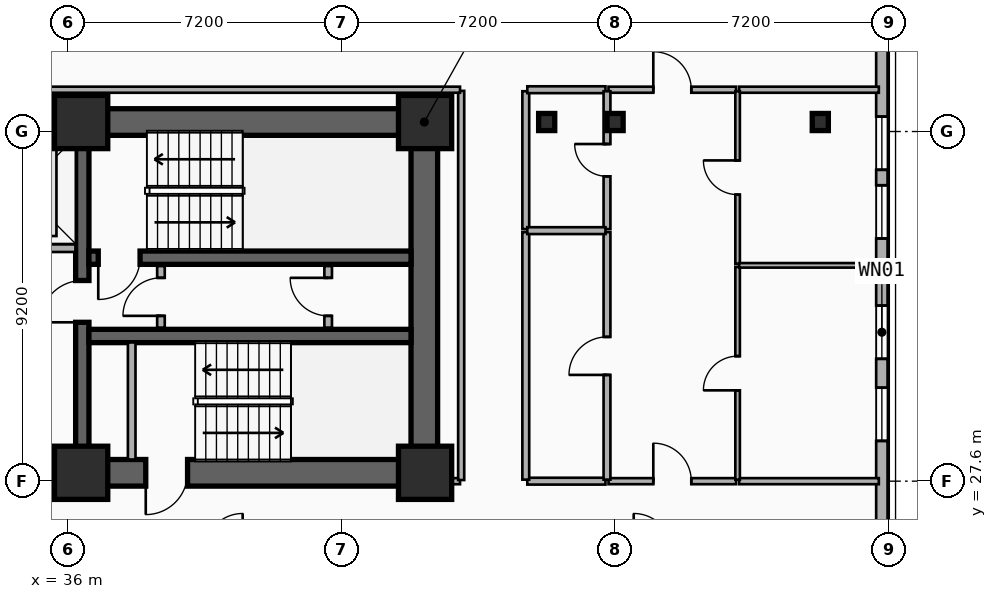
"""IFC4 building model, lengths in metres.
Left out: names, types, materials, properties, quantities, classifications, styles, units other than length and angle.
Written with IfcOpenShell. Run it as: python <this file> out.ifc"""

import sys

from ifc_helpers import new_model, si_unit, direction, frame, frame_2d, origin, origin_2d, place, context, subcontext, project, spatial, rectangle, i_section, extrude, element, fill, save


model = new_model("IFC4")
c1 = context("Model", 3, precision=1e-05, world=origin(), true_north=direction((0.0, 1.0)))
c2 = subcontext(c1, "Body", "Model", "MODEL_VIEW")
j1 = project(units=[si_unit("LENGTHUNIT", "METRE"), si_unit("PLANEANGLEUNIT", "RADIAN")], contexts=[c1])
p1 = place(None, origin())
s1 = spatial("IfcSite", under=j1, at=p1, CompositionType="ELEMENT")
p2 = place(p1, origin())
s2 = spatial("IfcBuilding", under=s1, at=p2, CompositionType="ELEMENT")
p3 = place(p2, frame((0.0, 0.0, 67.5)))
s3 = spatial("IfcBuildingStorey", under=s2, at=p3, CompositionType="ELEMENT", Elevation=67.5)
p4 = place(p3, frame((12.15, 37.05, 0.0), z_axis=(0.0, 0.0, 1.0), x_axis=(1.0, 0.0, 0.0)))
e1 = element("IfcWall", 1, at=p4, inside=s3, PredefinedType="SHEAR", context=c2, shape_type="SweptSolid", body=[
    extrude(rectangle(XDim=33.23, YDim=0.7, at=frame_2d((16.615, 0.0))), origin(), (0.0, 0.0, 1.0), 3.5),
])
p5 = place(p3, frame((45.38, 27.82, 0.0), z_axis=(0.0, 0.0, 1.0), x_axis=(-1.0, 0.0, 0.0)))
e2 = element("IfcWall", 2, at=p5, inside=s3, PredefinedType="SHEAR", context=c2, shape_type="SweptSolid", body=[
    extrude(rectangle(XDim=12.23, YDim=0.7, at=frame_2d((6.115, 0.0))), origin(), (0.0, 0.0, 1.0), 3.5),
])
p6 = place(p5, frame((9.93, 0.0, 0.0)))
e3 = element("IfcOpeningElement", 3, at=p6, cuts=e2, PredefinedType="OPENING", context=c2, shape_type="SweptSolid", body=[
    extrude(rectangle(XDim=1.1, YDim=2.15, at=frame_2d((0.55, 1.075))), frame((0.0, 0.36, 0.0), z_axis=(0.0, -1.0, 0.0), x_axis=(1.0, 0.0, 0.0)), (0.0, 0.0, 1.0), 0.72),
])
p7 = place(p5, frame((6.23, 0.0, 0.0)))
e4 = element("IfcOpeningElement", 4, at=p7, cuts=e2, PredefinedType="OPENING", context=c2, shape_type="SweptSolid", body=[
    extrude(rectangle(XDim=1.1, YDim=2.15, at=frame_2d((0.55, 1.075))), frame((0.0, 0.36, 0.0), z_axis=(0.0, -1.0, 0.0), x_axis=(1.0, 0.0, 0.0)), (0.0, 0.0, 1.0), 0.72),
])
p8 = place(p3, frame((45.38, 28.17, 0.0), z_axis=(0.0, 0.0, 1.0), x_axis=(0.0, 1.0, 0.0)))
e5 = element("IfcWall", 5, at=p8, inside=s3, PredefinedType="SHEAR", context=c2, shape_type="SweptSolid", body=[
    extrude(rectangle(XDim=8.53, YDim=0.7, at=frame_2d((4.265, 0.0))), origin(), (0.0, 0.0, 1.0), 3.5),
])
p9 = place(p3, frame((36.38, 28.17, 0.0), z_axis=(0.0, 0.0, 1.0), x_axis=(0.0, 1.0, 0.0)))
e6 = element("IfcWall", 6, at=p9, inside=s3, PredefinedType="SHEAR", context=c2, shape_type="SweptSolid", body=[
    extrude(rectangle(XDim=8.53, YDim=0.35, at=frame_2d((4.265, 0.0))), origin(), (0.0, 0.0, 1.0), 3.5),
])
p10 = place(p9, frame((3.61, 0.0, 0.0)))
e7 = element("IfcOpeningElement", 7, at=p10, cuts=e6, PredefinedType="OPENING", context=c2, shape_type="SweptSolid", body=[
    extrude(rectangle(XDim=1.1, YDim=2.15, at=frame_2d((0.55, 1.075))), frame((0.0, 0.185, 0.0), z_axis=(0.0, -1.0, 0.0), x_axis=(1.0, 0.0, 0.0)), (0.0, 0.0, 1.0), 0.37),
])
p11 = place(p3, frame((45.03, 33.48, 0.0), z_axis=(0.0, 0.0, 1.0), x_axis=(-1.0, 0.0, 0.0)))
e8 = element("IfcWall", 8, at=p11, inside=s3, PredefinedType="SHEAR", context=c2, shape_type="SweptSolid", body=[
    extrude(rectangle(XDim=8.475, YDim=0.35, at=frame_2d((4.238, 0.0))), origin(), (0.0, 0.0, 1.0), 3.5),
])
p12 = place(p11, frame((7.13, 0.0, 0.0)))
e9 = element("IfcOpeningElement", 9, at=p12, cuts=e8, PredefinedType="OPENING", context=c2, shape_type="SweptSolid", body=[
    extrude(rectangle(XDim=1.1, YDim=2.15, at=frame_2d((0.55, 1.075))), frame((0.0, 0.185, 0.0), z_axis=(0.0, -1.0, 0.0), x_axis=(1.0, 0.0, 0.0)), (0.0, 0.0, 1.0), 0.37),
])
p13 = place(p3, frame((36.555, 31.42, 0.0), z_axis=(0.0, 0.0, 1.0), x_axis=(1.0, 0.0, 0.0)))
e10 = element("IfcWall", 10, at=p13, inside=s3, PredefinedType="SHEAR", context=c2, shape_type="SweptSolid", body=[
    extrude(rectangle(XDim=8.475, YDim=0.35, at=frame_2d((4.238, 0.0))), origin(), (0.0, 0.0, 1.0), 3.5),
])
for number, where, z_axis, x_axis in (
    (11, (36.35, 27.82, 0.0), (0.0, 0.0, 1.0), (1.0, 0.0, 0.0)),
    (12, (36.35, 37.05, 0.0), (0.0, 0.0, 1.0), (1.0, 0.0, 0.0)),
    (13, (45.4, 27.82, 0.0), (0.0, 0.0, 1.0), (1.0, 0.0, 0.0)),
    (14, (45.4, 37.05, 0.0), (0.0, 0.0, 1.0), (1.0, 0.0, 0.0)),
):
    element("IfcColumn", number, at=place(p3, frame(where, z_axis=z_axis, x_axis=x_axis)), inside=s3, PredefinedType="COLUMN", context=c2, shape_type="SweptSolid", body=[
        extrude(rectangle(XDim=1.4, YDim=1.4, at=origin_2d()), origin(), (0.0, 0.0, 1.0), 3.5),
    ])
for number, where, z_axis, x_axis in (
    (15, (48.6, 37.05, 0.0), (0.0, 0.0, 1.0), (1.0, 0.0, 0.0)),
    (16, (50.4, 37.05, 0.0), (0.0, 0.0, 1.0), (1.0, 0.0, 0.0)),
    (17, (55.8, 37.05, 0.0), (0.0, 0.0, 1.0), (1.0, 0.0, 0.0)),
):
    element("IfcColumn", number, at=place(p3, frame(where, z_axis=z_axis, x_axis=x_axis)), inside=s3, PredefinedType="COLUMN", context=c2, shape_type="SweptSolid", body=[
        extrude(i_section(OverallWidth=0.424, OverallDepth=0.45, WebThickness=0.041, FlangeThickness=0.065, FilletRadius=0.015, at=origin_2d()), origin(), (0.0, 0.0, 1.0), 3.5),
    ])
p14 = place(p3, frame((57.42, 41.0, 0.0), z_axis=(0.0, 0.0, 1.0), x_axis=(0.0, -1.0, 0.0)))
e18 = element("IfcWall", 18, at=p14, inside=s3, PredefinedType="SOLIDWALL", context=c2, shape_type="SweptSolid", body=[
    extrude(rectangle(XDim=15.2, YDim=0.3, at=frame_2d((7.6, 0.0))), origin(), (0.0, 0.0, 1.0), 3.24),
])
p15 = place(p14, frame((8.781, 0.0, 0.48)))
e19 = element("IfcOpeningElement", 19, at=p15, cuts=e18, PredefinedType="OPENING", context=c2, shape_type="SweptSolid", body=[
    extrude(rectangle(XDim=1.4, YDim=1.8, at=frame_2d((0.7, 0.9))), frame((0.0, 0.16, 0.0), z_axis=(0.0, -1.0, 0.0), x_axis=(1.0, 0.0, 0.0)), (0.0, 0.0, 1.0), 0.32),
])
p16 = place(p14, frame((10.94, 0.0, 0.48)))
e20 = element("IfcOpeningElement", 20, at=p16, cuts=e18, PredefinedType="OPENING", context=c2, shape_type="SweptSolid", body=[
    extrude(rectangle(XDim=1.4, YDim=1.8, at=frame_2d((0.7, 0.9))), frame((0.0, 0.16, 0.0), z_axis=(0.0, -1.0, 0.0), x_axis=(1.0, 0.0, 0.0)), (0.0, 0.0, 1.0), 0.32),
])
p17 = place(p14, frame((3.807, 0.0, 0.48)))
e21 = element("IfcOpeningElement", 21, at=p17, cuts=e18, PredefinedType="OPENING", context=c2, shape_type="SweptSolid", body=[
    extrude(rectangle(XDim=1.4, YDim=1.8, at=frame_2d((0.7, 0.9))), frame((0.0, 0.16, 0.0), z_axis=(0.0, -1.0, 0.0), x_axis=(1.0, 0.0, 0.0)), (0.0, 0.0, 1.0), 0.32),
])
p18 = place(p14, frame((5.614, 0.0, 0.48)))
e22 = element("IfcOpeningElement", 22, at=p18, cuts=e18, PredefinedType="OPENING", context=c2, shape_type="SweptSolid", body=[
    extrude(rectangle(XDim=1.4, YDim=1.8, at=frame_2d((0.7, 0.9))), frame((0.0, 0.16, 0.0), z_axis=(0.0, -1.0, 0.0), x_axis=(1.0, 0.0, 0.0)), (0.0, 0.0, 1.0), 0.32),
])
p19 = place(p3, frame((33.475, 33.73, 0.0), z_axis=(0.0, 0.0, 1.0), x_axis=(1.0, 0.0, 0.0)))
e23 = element("IfcWall", 23, at=p19, inside=s3, PredefinedType="PARTITIONING", context=c2, shape_type="SweptSolid", body=[
    extrude(rectangle(XDim=2.725, YDim=0.2, at=frame_2d((1.362, 0.0))), origin(), (0.0, 0.0, 1.0), 2.212),
])
p20 = place(p19, frame((0.812, 0.0, 0.0)))
e24 = element("IfcOpeningElement", 24, at=p20, cuts=e23, PredefinedType="OPENING", context=c2, shape_type="SweptSolid", body=[
    extrude(rectangle(XDim=1.1, YDim=2.15, at=frame_2d((0.55, 1.075))), frame((0.0, 0.11, 0.0), z_axis=(0.0, -1.0, 0.0), x_axis=(1.0, 0.0, 0.0)), (0.0, 0.0, 1.0), 0.22),
])
p21 = place(p3, frame((37.68, 28.17, 0.0), z_axis=(0.0, 0.0, 1.0), x_axis=(0.0, 1.0, 0.0)))
e25 = element("IfcWall", 25, at=p21, inside=s3, PredefinedType="PARTITIONING", context=c2, shape_type="SweptSolid", body=[
    extrude(rectangle(XDim=3.08, YDim=0.2, at=frame_2d((1.54, 0.0))), origin(), (0.0, 0.0, 1.0), 2.62),
])
p22 = place(p3, frame((38.45, 31.64, 0.0), z_axis=(0.0, 0.0, 1.0), x_axis=(0.0, 1.0, 0.0)))
e26 = element("IfcWall", 26, at=p22, inside=s3, PredefinedType="PARTITIONING", context=c2, shape_type="SweptSolid", body=[
    extrude(rectangle(XDim=1.62, YDim=0.2, at=frame_2d((0.81, 0.0))), origin(), (0.0, 0.0, 1.0), 3.24),
])
p23 = place(p22, frame((0.31, 0.0, 0.0)))
e27 = element("IfcOpeningElement", 27, at=p23, cuts=e26, PredefinedType="OPENING", context=c2, shape_type="SweptSolid", body=[
    extrude(rectangle(XDim=1.0, YDim=2.15, at=frame_2d((0.5, 1.075))), frame((0.0, 0.11, 0.0), z_axis=(0.0, -1.0, 0.0), x_axis=(1.0, 0.0, 0.0)), (0.0, 0.0, 1.0), 0.22),
])
p24 = place(p3, frame((42.85, 31.64, 0.0), z_axis=(0.0, 0.0, 1.0), x_axis=(0.0, 1.0, 0.0)))
e28 = element("IfcWall", 28, at=p24, inside=s3, PredefinedType="PARTITIONING", context=c2, shape_type="SweptSolid", body=[
    extrude(rectangle(XDim=1.62, YDim=0.2, at=frame_2d((0.81, 0.0))), origin(), (0.0, 0.0, 1.0), 3.24),
])
p25 = place(p24, frame((0.31, 0.0, 0.0)))
e29 = element("IfcOpeningElement", 29, at=p25, cuts=e28, PredefinedType="OPENING", context=c2, shape_type="SweptSolid", body=[
    extrude(rectangle(XDim=1.0, YDim=2.15, at=frame_2d((0.5, 1.075))), frame((0.0, 0.11, 0.0), z_axis=(0.0, -1.0, 0.0), x_axis=(1.0, 0.0, 0.0)), (0.0, 0.0, 1.0), 0.22),
])
p26 = place(p3, frame((50.227, 27.6, 0.0), z_axis=(0.0, 0.0, 1.0), x_axis=(1.0, 0.0, 0.0)))
e30 = element("IfcWall", 30, at=p26, inside=s3, PredefinedType="PARTITIONING", context=c2, shape_type="SweptSolid", body=[
    extrude(rectangle(XDim=3.357, YDim=0.16, at=frame_2d((1.678, 0.0))), origin(), (0.0, 0.0, 1.0), 2.57),
])
p27 = place(p26, frame((1.178, 0.0, 0.0)))
e31 = element("IfcOpeningElement", 31, at=p27, cuts=e30, PredefinedType="OPENING", context=c2, shape_type="SweptSolid", body=[
    extrude(rectangle(XDim=1.0, YDim=2.15, at=frame_2d((0.5, 1.075))), frame((0.0, 0.09, 0.0), z_axis=(0.0, -1.0, 0.0), x_axis=(1.0, 0.0, 0.0)), (0.0, 0.0, 1.0), 0.18),
])
p28 = place(p3, frame((48.09, 27.6, 0.0), z_axis=(0.0, 0.0, 1.0), x_axis=(1.0, 0.0, 0.0)))
e32 = element("IfcWall", 32, at=p28, inside=s3, PredefinedType="PLUMBINGWALL", context=c2, shape_type="SweptSolid", body=[
    extrude(rectangle(XDim=2.057, YDim=0.18, at=frame_2d((1.028, 0.0))), origin(), (0.0, 0.0, 1.0), 2.57),
])
p29 = place(p3, frame((53.664, 27.6, 0.0), z_axis=(0.0, 0.0, 1.0), x_axis=(1.0, 0.0, 0.0)))
e33 = element("IfcWall", 33, at=p29, inside=s3, PredefinedType="PARTITIONING", context=c2, shape_type="SweptSolid", body=[
    extrude(rectangle(XDim=3.676, YDim=0.16, at=frame_2d((1.838, 0.0))), origin(), (0.0, 0.0, 1.0), 2.57),
])
p30 = place(p3, frame((48.05, 27.64, 0.0), z_axis=(0.0, 0.0, 1.0), x_axis=(0.0, 1.0, 0.0)))
e34 = element("IfcWall", 34, at=p30, inside=s3, PredefinedType="PLUMBINGWALL", context=c2, shape_type="SweptSolid", body=[
    extrude(rectangle(XDim=6.512, YDim=0.18, at=frame_2d((3.256, 0.0))), origin(), (0.0, 0.0, 1.0), 3.24),
])
p31 = place(p3, frame((48.05, 34.232, 0.0), z_axis=(0.0, 0.0, 1.0), x_axis=(0.0, 1.0, 0.0)))
e35 = element("IfcWall", 35, at=p31, inside=s3, PredefinedType="PLUMBINGWALL", context=c2, shape_type="SweptSolid", body=[
    extrude(rectangle(XDim=3.628, YDim=0.18, at=frame_2d((1.814, 0.0))), origin(), (0.0, 0.0, 1.0), 2.72),
])
p32 = place(p3, frame((50.227, 37.9, 0.0), z_axis=(0.0, 0.0, 1.0), x_axis=(1.0, 0.0, 0.0)))
e36 = element("IfcWall", 36, at=p32, inside=s3, PredefinedType="PARTITIONING", context=c2, shape_type="SweptSolid", body=[
    extrude(rectangle(XDim=3.357, YDim=0.16, at=frame_2d((1.678, 0.0))), origin(), (0.0, 0.0, 1.0), 3.24),
])
p33 = place(p32, frame((1.178, 0.0, 0.0)))
e37 = element("IfcOpeningElement", 37, at=p33, cuts=e36, PredefinedType="OPENING", context=c2, shape_type="SweptSolid", body=[
    extrude(rectangle(XDim=1.0, YDim=2.15, at=frame_2d((0.5, 1.075))), frame((0.0, 0.09, 0.0), z_axis=(0.0, -1.0, 0.0), x_axis=(1.0, 0.0, 0.0)), (0.0, 0.0, 1.0), 0.18),
])
p34 = place(p3, frame((48.09, 37.9, 0.0), z_axis=(0.0, 0.0, 1.0), x_axis=(1.0, 0.0, 0.0)))
e38 = element("IfcWall", 38, at=p34, inside=s3, PredefinedType="PLUMBINGWALL", context=c2, shape_type="SweptSolid", body=[
    extrude(rectangle(XDim=2.057, YDim=0.18, at=frame_2d((1.028, 0.0))), origin(), (0.0, 0.0, 1.0), 3.24),
])
p35 = place(p3, frame((53.664, 37.9, 0.0), z_axis=(0.0, 0.0, 1.0), x_axis=(1.0, 0.0, 0.0)))
e39 = element("IfcWall", 39, at=p35, inside=s3, PredefinedType="PARTITIONING", context=c2, shape_type="SweptSolid", body=[
    extrude(rectangle(XDim=3.676, YDim=0.16, at=frame_2d((1.838, 0.0))), origin(), (0.0, 0.0, 1.0), 3.24),
])
p36 = place(p3, frame((50.187, 27.64, 0.0), z_axis=(0.0, 0.0, 1.0), x_axis=(0.0, 1.0, 0.0)))
e40 = element("IfcWall", 40, at=p36, inside=s3, PredefinedType="PLUMBINGWALL", context=c2, shape_type="SweptSolid", body=[
    extrude(rectangle(XDim=6.512, YDim=0.18, at=frame_2d((3.256, 0.0))), origin(), (0.0, 0.0, 1.0), 2.57),
])
p37 = place(p36, frame((2.756, 0.0, 0.0)))
e41 = element("IfcOpeningElement", 41, at=p37, cuts=e40, PredefinedType="OPENING", context=c2, shape_type="SweptSolid", body=[
    extrude(rectangle(XDim=1.0, YDim=2.15, at=frame_2d((0.5, 1.075))), frame((0.0, 0.1, 0.0), z_axis=(0.0, -1.0, 0.0), x_axis=(1.0, 0.0, 0.0)), (0.0, 0.0, 1.0), 0.2),
])
p38 = place(p3, frame((50.187, 34.232, 0.0), z_axis=(0.0, 0.0, 1.0), x_axis=(0.0, 1.0, 0.0)))
e42 = element("IfcWall", 42, at=p38, inside=s3, PredefinedType="PLUMBINGWALL", context=c2, shape_type="SweptSolid", body=[
    extrude(rectangle(XDim=3.628, YDim=0.18, at=frame_2d((1.814, 0.0))), origin(), (0.0, 0.0, 1.0), 2.57),
])
p39 = place(p38, frame((1.389, 0.0, 0.0)))
e43 = element("IfcOpeningElement", 43, at=p39, cuts=e42, PredefinedType="OPENING", context=c2, shape_type="SweptSolid", body=[
    extrude(rectangle(XDim=0.85, YDim=2.1, at=frame_2d((0.425, 1.05))), frame((0.0, 0.1, 0.0), z_axis=(0.0, -1.0, 0.0), x_axis=(1.0, 0.0, 0.0)), (0.0, 0.0, 1.0), 0.2),
])
p40 = place(p3, frame((53.624, 27.64, 0.0), z_axis=(0.0, 0.0, 1.0), x_axis=(0.0, 1.0, 0.0)))
e44 = element("IfcWall", 44, at=p40, inside=s3, PredefinedType="PARTITIONING", context=c2, shape_type="SweptSolid", body=[
    extrude(rectangle(XDim=5.599, YDim=0.12, at=frame_2d((2.8, 0.0))), origin(), (0.0, 0.0, 1.0), 3.24),
])
p41 = place(p40, frame((2.35, 0.0, 0.0)))
e45 = element("IfcOpeningElement", 45, at=p41, cuts=e44, PredefinedType="OPENING", context=c2, shape_type="SweptSolid", body=[
    extrude(rectangle(XDim=0.9, YDim=2.1, at=frame_2d((0.45, 1.05))), frame((0.0, 0.07, 0.0), z_axis=(0.0, -1.0, 0.0), x_axis=(1.0, 0.0, 0.0)), (0.0, 0.0, 1.0), 0.14),
])
p42 = place(p3, frame((53.624, 33.319, 0.0), z_axis=(0.0, 0.0, 1.0), x_axis=(0.0, 1.0, 0.0)))
e46 = element("IfcWall", 46, at=p42, inside=s3, PredefinedType="PARTITIONING", context=c2, shape_type="SweptSolid", body=[
    extrude(rectangle(XDim=4.541, YDim=0.12, at=frame_2d((2.271, 0.0))), origin(), (0.0, 0.0, 1.0), 2.72),
])
p43 = place(p42, frame((1.821, 0.0, 0.0)))
e47 = element("IfcOpeningElement", 47, at=p43, cuts=e46, PredefinedType="OPENING", context=c2, shape_type="SweptSolid", body=[
    extrude(rectangle(XDim=0.9, YDim=2.1, at=frame_2d((0.45, 1.05))), frame((0.0, 0.07, 0.0), z_axis=(0.0, -1.0, 0.0), x_axis=(1.0, 0.0, 0.0)), (0.0, 0.0, 1.0), 0.14),
])
p44 = place(p3, frame((48.09, 34.192, 0.0), z_axis=(0.0, 0.0, 1.0), x_axis=(1.0, 0.0, 0.0)))
e48 = element("IfcWall", 48, at=p44, inside=s3, PredefinedType="PLUMBINGWALL", context=c2, shape_type="SweptSolid", body=[
    extrude(rectangle(XDim=2.057, YDim=0.18, at=frame_2d((1.028, 0.0))), origin(), (0.0, 0.0, 1.0), 2.57),
])
p45 = place(p3, frame((53.664, 33.279, 0.0), z_axis=(0.0, 0.0, 1.0), x_axis=(1.0, 0.0, 0.0)))
e49 = element("IfcWall", 49, at=p45, inside=s3, PredefinedType="PARTITIONING", context=c2, shape_type="SweptSolid", body=[
    extrude(rectangle(XDim=3.676, YDim=0.12, at=frame_2d((1.838, 0.0))), origin(), (0.0, 0.0, 1.0), 2.57),
])
p46 = place(p3, frame((45.41, 27.6, 0.0), z_axis=(0.0, 0.0, 1.0), x_axis=(1.0, 0.0, 0.0)))
e50 = element("IfcWall", 50, at=p46, inside=s3, PredefinedType="PARTITIONING", context=c2, shape_type="SweptSolid", body=[
    extrude(rectangle(XDim=0.91, YDim=0.16, at=frame_2d((0.455, 0.0))), origin(), (0.0, 0.0, 1.0), 2.28),
])
p47 = place(p3, frame((46.35, 27.63, 0.0), z_axis=(0.0, 0.0, 1.0), x_axis=(0.0, 1.0, 0.0)))
e51 = element("IfcWall", 51, at=p47, inside=s3, PredefinedType="PARTITIONING", context=c2, shape_type="SweptSolid", body=[
    extrude(rectangle(XDim=10.24, YDim=0.16, at=frame_2d((5.12, 0.0))), origin(), (0.0, 0.0, 1.0), 2.72),
])
p48 = place(p3, frame((11.28, 37.9, 0.0), z_axis=(0.0, 0.0, 1.0), x_axis=(1.0, 0.0, 0.0)))
e52 = element("IfcWall", 52, at=p48, inside=s3, PredefinedType="PARTITIONING", context=c2, shape_type="SweptSolid", body=[
    extrude(rectangle(XDim=35.04, YDim=0.16, at=frame_2d((17.52, 0.0))), origin(), (0.0, 0.0, 1.0), 3.24),
])
p49 = place(p15, origin())
e53 = element("IfcWindow", 53, at=p49, inside=s3, PartitioningType="SINGLE_PANEL", PredefinedType="WINDOW", context=c2, shape_type="SweptSolid", body=[
    extrude(rectangle(XDim=1.4, YDim=1.8, at=frame_2d((0.7, 0.9))), frame((0.0, 0.03, 0.0), z_axis=(0.0, -1.0, 0.0), x_axis=(1.0, 0.0, 0.0)), (0.0, 0.0, 1.0), 0.06),
])
fill(e19, e53)
p50 = place(p16, origin())
e54 = element("IfcWindow", 54, at=p50, inside=s3, PartitioningType="SINGLE_PANEL", PredefinedType="WINDOW", context=c2, shape_type="SweptSolid", body=[
    extrude(rectangle(XDim=1.4, YDim=1.8, at=frame_2d((0.7, 0.9))), frame((0.0, 0.03, 0.0), z_axis=(0.0, -1.0, 0.0), x_axis=(1.0, 0.0, 0.0)), (0.0, 0.0, 1.0), 0.06),
])
fill(e20, e54)
p51 = place(p17, origin())
e55 = element("IfcWindow", 55, at=p51, inside=s3, PartitioningType="SINGLE_PANEL", PredefinedType="WINDOW", context=c2, shape_type="SweptSolid", body=[
    extrude(rectangle(XDim=1.4, YDim=1.8, at=frame_2d((0.7, 0.9))), frame((0.0, 0.03, 0.0), z_axis=(0.0, -1.0, 0.0), x_axis=(1.0, 0.0, 0.0)), (0.0, 0.0, 1.0), 0.06),
])
fill(e21, e55)
p52 = place(p18, origin())
e56 = element("IfcWindow", 56, at=p52, inside=s3, PartitioningType="SINGLE_PANEL", PredefinedType="WINDOW", context=c2, shape_type="SweptSolid", body=[
    extrude(rectangle(XDim=1.4, YDim=1.8, at=frame_2d((0.7, 0.9))), frame((0.0, 0.03, 0.0), z_axis=(0.0, -1.0, 0.0), x_axis=(1.0, 0.0, 0.0)), (0.0, 0.0, 1.0), 0.06),
])
fill(e22, e56)
p53 = place(p12, origin())
e57 = element("IfcDoor", 57, at=p53, inside=s3, OperationType="SINGLE_SWING_RIGHT", PredefinedType="DOOR", context=c2, shape_type="SweptSolid", body=[
    extrude(rectangle(XDim=1.1, YDim=2.15, at=frame_2d((0.55, 1.075))), frame((0.0, 0.025, 0.0), z_axis=(0.0, -1.0, 0.0), x_axis=(1.0, 0.0, 0.0)), (0.0, 0.0, 1.0), 0.05),
])
fill(e9, e57)
p54 = place(p10, origin())
e58 = element("IfcDoor", 58, at=p54, inside=s3, OperationType="SINGLE_SWING_LEFT", PredefinedType="DOOR", context=c2, shape_type="SweptSolid", body=[
    extrude(rectangle(XDim=1.1, YDim=2.15, at=frame_2d((0.55, 1.075))), frame((0.0, 0.025, 0.0), z_axis=(0.0, -1.0, 0.0), x_axis=(1.0, 0.0, 0.0)), (0.0, 0.0, 1.0), 0.05),
])
fill(e7, e58)
p55 = place(p7, origin())
e59 = element("IfcDoor", 59, at=p55, inside=s3, OperationType="SINGLE_SWING_RIGHT", PredefinedType="DOOR", context=c2, shape_type="SweptSolid", body=[
    extrude(rectangle(XDim=1.1, YDim=2.15, at=frame_2d((0.55, 1.075))), frame((0.0, 0.025, 0.0), z_axis=(0.0, -1.0, 0.0), x_axis=(1.0, 0.0, 0.0)), (0.0, 0.0, 1.0), 0.05),
])
fill(e4, e59)
p56 = place(p23, origin())
e60 = element("IfcDoor", 60, at=p56, inside=s3, OperationType="SINGLE_SWING_LEFT", PredefinedType="DOOR", context=c2, shape_type="SweptSolid", body=[
    extrude(rectangle(XDim=1.0, YDim=2.15, at=frame_2d((0.5, 1.075))), frame((0.0, 0.025, 0.0), z_axis=(0.0, -1.0, 0.0), x_axis=(1.0, 0.0, 0.0)), (0.0, 0.0, 1.0), 0.05),
])
fill(e27, e60)
p57 = place(p25, origin())
e61 = element("IfcDoor", 61, at=p57, inside=s3, OperationType="SINGLE_SWING_RIGHT", PredefinedType="DOOR", context=c2, shape_type="SweptSolid", body=[
    extrude(rectangle(XDim=1.0, YDim=2.15, at=frame_2d((0.5, 1.075))), frame((0.0, 0.025, 0.0), z_axis=(0.0, -1.0, 0.0), x_axis=(1.0, 0.0, 0.0)), (0.0, 0.0, 1.0), 0.05),
])
fill(e29, e61)
p58 = place(p27, origin())
e62 = element("IfcDoor", 62, at=p58, inside=s3, OperationType="SINGLE_SWING_LEFT", PredefinedType="DOOR", context=c2, shape_type="SweptSolid", body=[
    extrude(rectangle(XDim=1.0, YDim=2.15, at=frame_2d((0.5, 1.075))), frame((0.0, 0.025, 0.0), z_axis=(0.0, -1.0, 0.0), x_axis=(1.0, 0.0, 0.0)), (0.0, 0.0, 1.0), 0.05),
])
fill(e31, e62)
p59 = place(p33, origin())
e63 = element("IfcDoor", 63, at=p59, inside=s3, OperationType="SINGLE_SWING_LEFT", PredefinedType="DOOR", context=c2, shape_type="SweptSolid", body=[
    extrude(rectangle(XDim=1.0, YDim=2.15, at=frame_2d((0.5, 1.075))), frame((0.0, 0.025, 0.0), z_axis=(0.0, -1.0, 0.0), x_axis=(1.0, 0.0, 0.0)), (0.0, 0.0, 1.0), 0.05),
])
fill(e37, e63)
p60 = place(p37, origin())
e64 = element("IfcDoor", 64, at=p60, inside=s3, OperationType="SINGLE_SWING_LEFT", PredefinedType="DOOR", context=c2, shape_type="SweptSolid", body=[
    extrude(rectangle(XDim=1.0, YDim=2.15, at=frame_2d((0.5, 1.075))), frame((0.0, 0.025, 0.0), z_axis=(0.0, -1.0, 0.0), x_axis=(1.0, 0.0, 0.0)), (0.0, 0.0, 1.0), 0.05),
])
fill(e41, e64)
p61 = place(p39, origin())
e65 = element("IfcDoor", 65, at=p61, inside=s3, OperationType="SINGLE_SWING_RIGHT", PredefinedType="DOOR", context=c2, shape_type="SweptSolid", body=[
    extrude(rectangle(XDim=0.85, YDim=2.1, at=frame_2d((0.425, 1.05))), frame((0.0, 0.025, 0.0), z_axis=(0.0, -1.0, 0.0), x_axis=(1.0, 0.0, 0.0)), (0.0, 0.0, 1.0), 0.05),
])
fill(e43, e65)
p62 = place(p41, origin())
e66 = element("IfcDoor", 66, at=p62, inside=s3, OperationType="SINGLE_SWING_LEFT", PredefinedType="DOOR", context=c2, shape_type="SweptSolid", body=[
    extrude(rectangle(XDim=0.9, YDim=2.1, at=frame_2d((0.45, 1.05))), frame((0.0, 0.025, 0.0), z_axis=(0.0, -1.0, 0.0), x_axis=(1.0, 0.0, 0.0)), (0.0, 0.0, 1.0), 0.05),
])
fill(e45, e66)
p63 = place(p43, origin())
e67 = element("IfcDoor", 67, at=p63, inside=s3, OperationType="SINGLE_SWING_RIGHT", PredefinedType="DOOR", context=c2, shape_type="SweptSolid", body=[
    extrude(rectangle(XDim=0.9, YDim=2.1, at=frame_2d((0.45, 1.05))), frame((0.0, 0.025, 0.0), z_axis=(0.0, -1.0, 0.0), x_axis=(1.0, 0.0, 0.0)), (0.0, 0.0, 1.0), 0.05),
])
fill(e47, e67)
save(model, sys.argv[1])
